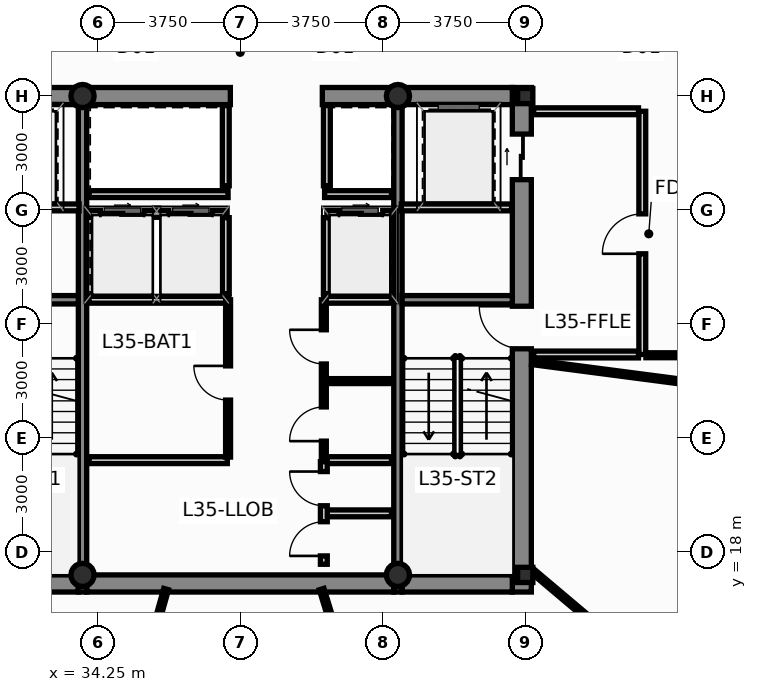
"""IFC4 building model, lengths in metres.
Left out: names, types, materials, properties, quantities, classifications, styles, units other than length and angle.
Written with IfcOpenShell. Run it as: python <this file> out.ifc"""

import sys

from ifc_helpers import new_model, si_unit, direction, frame, frame_2d, origin, origin_2d, place, context, subcontext, project, spatial, rectangle, hollow_circle, i_section, extrude, source, transform, mapped, element, fill, save


model = new_model("IFC4")
c1 = context("Model", 3, precision=1e-05, world=origin(), true_north=direction((0.0, 1.0)))
c2 = subcontext(c1, "Body", "Model", "MODEL_VIEW")
j1 = project(units=[si_unit("LENGTHUNIT", "METRE"), si_unit("PLANEANGLEUNIT", "RADIAN")], contexts=[c1])
p1 = place(None, origin())
s1 = spatial("IfcSite", under=j1, at=p1, CompositionType="ELEMENT")
p2 = place(p1, origin())
s2 = spatial("IfcBuilding", under=s1, at=p2, CompositionType="ELEMENT")
p3 = place(p2, frame((0.0, 0.0, 135.45)))
s3 = spatial("IfcBuildingStorey", under=s2, at=p3, CompositionType="ELEMENT", Elevation=135.45)
m1 = source(origin(), c2, "Body", "SweptSolid", [
    extrude(i_section(OverallWidth=0.4, OverallDepth=0.4, WebThickness=0.02, FlangeThickness=0.032, at=origin_2d()), origin(), (0.0, 0.0, 1.0), 3.65),
])
for number, where, z_axis, x_axis in (
    (1, (45.5, 17.4, 0.0), (0.0, 0.0, 1.0), (1.0, 0.0, 0.0)),
    (2, (45.5, 30.0, 0.0), (0.0, 0.0, 1.0), (1.0, 0.0, 0.0)),
):
    element("IfcColumn", number, at=place(p3, frame(where, z_axis=z_axis, x_axis=x_axis)), inside=s3, PredefinedType="COLUMN", context=c2, shape_type="MappedRepresentation", body=[
        mapped(m1, transform((0.0, 0.0, 0.0), scale=1.0)),
    ])
m2 = source(origin(), c2, "Body", "SweptSolid", [
    extrude(hollow_circle(Radius=0.305, WallThickness=0.025, at=origin_2d()), origin(), (0.0, 0.0, 1.0), 3.65),
])
for number, where, z_axis, x_axis in (
    (3, (33.85, 17.4, 0.0), (0.0, 0.0, 1.0), (1.0, 0.0, 0.0)),
    (4, (42.15, 17.4, 0.0), (0.0, 0.0, 1.0), (1.0, 0.0, 0.0)),
    (5, (33.85, 30.0, 0.0), (0.0, 0.0, 1.0), (1.0, 0.0, 0.0)),
    (6, (42.15, 30.0, 0.0), (0.0, 0.0, 1.0), (1.0, 0.0, 0.0)),
):
    element("IfcColumn", number, at=place(p3, frame(where, z_axis=z_axis, x_axis=x_axis)), inside=s3, PredefinedType="COLUMN", context=c2, shape_type="MappedRepresentation", body=[
        mapped(m2, transform((0.0, 0.0, 0.0), scale=1.0)),
    ])
p4 = place(p3, frame((45.41, 16.95, 0.0), z_axis=(0.0, 0.0, 1.0), x_axis=(0.0, 1.0, 0.0)))
e7 = element("IfcWall", 7, at=p4, inside=s3, PredefinedType="SHEAR", context=c2, shape_type="SweptSolid", body=[
    extrude(rectangle(XDim=13.275, YDim=0.5, at=frame_2d((6.638, 0.0))), origin(), (0.0, 0.0, 1.0), 3.65),
])
p5 = place(p4, frame((6.4, 0.0, 0.0)))
e8 = element("IfcOpeningElement", 8, at=p5, cuts=e7, PredefinedType="OPENING", context=c2, shape_type="SweptSolid", body=[
    extrude(rectangle(XDim=1.12, YDim=2.15, at=frame_2d((0.56, 1.075))), frame((0.0, 0.262, 0.0), z_axis=(0.0, -1.0, 0.0), x_axis=(1.0, 0.0, 0.0)), (0.0, 0.0, 1.0), 0.524),
])
p6 = place(p4, frame((10.85, 0.0, 0.0)))
e9 = element("IfcOpeningElement", 9, at=p6, cuts=e7, PredefinedType="OPENING", context=c2, shape_type="SweptSolid", body=[
    extrude(rectangle(XDim=1.2, YDim=2.2, at=frame_2d((0.6, 1.1))), frame((0.0, 0.262, 0.0), z_axis=(0.0, -1.0, 0.0), x_axis=(1.0, 0.0, 0.0)), (0.0, 0.0, 1.0), 0.524),
])
p7 = place(p3, frame((30.84, 17.175, 0.0), z_axis=(0.0, 0.0, 1.0), x_axis=(1.0, 0.0, 0.0)))
e10 = element("IfcWall", 10, at=p7, inside=s3, PredefinedType="SHEAR", context=c2, shape_type="SweptSolid", body=[
    extrude(rectangle(XDim=2.9, YDim=0.45, at=frame_2d((1.45, 0.0))), origin(), (0.0, 0.0, 1.0), 3.65),
])
p8 = place(p3, frame((33.96, 17.175, 0.0), z_axis=(0.0, 0.0, 1.0), x_axis=(1.0, 0.0, 0.0)))
e11 = element("IfcWall", 11, at=p8, inside=s3, PredefinedType="SHEAR", context=c2, shape_type="SweptSolid", body=[
    extrude(rectangle(XDim=8.08, YDim=0.45, at=frame_2d((4.04, 0.0))), origin(), (0.0, 0.0, 1.0), 3.65),
])
for number, where, z_axis, x_axis in (
    (12, (42.26, 17.175, 0.0), (0.0, 0.0, 1.0), (1.0, 0.0, 0.0)),
    (13, (30.84, 30.0, 0.0), (0.0, 0.0, 1.0), (1.0, 0.0, 0.0)),
):
    element("IfcWall", number, at=place(p3, frame(where, z_axis=z_axis, x_axis=x_axis)), inside=s3, PredefinedType="SHEAR", context=c2, shape_type="SweptSolid", body=[
        extrude(rectangle(XDim=2.9, YDim=0.45, at=frame_2d((1.45, 0.0))), origin(), (0.0, 0.0, 1.0), 3.65),
    ])
p9 = place(p3, frame((33.96, 30.0, 0.0), z_axis=(0.0, 0.0, 1.0), x_axis=(1.0, 0.0, 0.0)))
e14 = element("IfcWall", 14, at=p9, inside=s3, PredefinedType="SHEAR", context=c2, shape_type="SweptSolid", body=[
    extrude(rectangle(XDim=3.78, YDim=0.45, at=frame_2d((1.89, 0.0))), origin(), (0.0, 0.0, 1.0), 3.65),
])
p10 = place(p3, frame((40.16, 30.0, 0.0), z_axis=(0.0, 0.0, 1.0), x_axis=(1.0, 0.0, 0.0)))
e15 = element("IfcWall", 15, at=p10, inside=s3, PredefinedType="SHEAR", context=c2, shape_type="SweptSolid", body=[
    extrude(rectangle(XDim=1.88, YDim=0.45, at=frame_2d((0.94, 0.0))), origin(), (0.0, 0.0, 1.0), 3.65),
])
p11 = place(p3, frame((42.26, 30.0, 0.0), z_axis=(0.0, 0.0, 1.0), x_axis=(1.0, 0.0, 0.0)))
e16 = element("IfcWall", 16, at=p11, inside=s3, PredefinedType="SHEAR", context=c2, shape_type="SweptSolid", body=[
    extrude(rectangle(XDim=2.9, YDim=0.45, at=frame_2d((1.45, 0.0))), origin(), (0.0, 0.0, 1.0), 3.65),
])
for number, where, z_axis, x_axis in (
    (17, (33.85, 16.95, 0.0), (0.0, 0.0, 1.0), (0.0, 1.0, 0.0)),
    (18, (42.15, 16.95, 0.0), (0.0, 0.0, 1.0), (0.0, 1.0, 0.0)),
):
    element("IfcWall", number, at=place(p3, frame(where, z_axis=z_axis, x_axis=x_axis)), inside=s3, PredefinedType="SHEAR", context=c2, shape_type="SweptSolid", body=[
        extrude(rectangle(XDim=13.275, YDim=0.22, at=frame_2d((6.638, 0.0))), origin(), (0.0, 0.0, 1.0), 3.65),
    ])
for number, where, z_axis, x_axis in (
    (19, (30.84, 24.64, 0.0), (0.0, 0.0, 1.0), (1.0, 0.0, 0.0)),
    (20, (42.26, 24.64, 0.0), (0.0, 0.0, 1.0), (1.0, 0.0, 0.0)),
):
    element("IfcWall", number, at=place(p3, frame(where, z_axis=z_axis, x_axis=x_axis)), inside=s3, PredefinedType="SHEAR", context=c2, shape_type="SweptSolid", body=[
        extrude(rectangle(XDim=2.9, YDim=0.22, at=frame_2d((1.45, 0.0))), origin(), (0.0, 0.0, 1.0), 3.65),
    ])
p12 = place(p3, frame((34.02, 26.9, 0.0), z_axis=(0.0, 0.0, 1.0), x_axis=(1.0, 0.0, 0.0)))
e21 = element("IfcWall", 21, at=p12, inside=s3, PredefinedType="PARTITIONING", context=c2, shape_type="SweptSolid", body=[
    extrude(rectangle(XDim=3.6, YDim=0.18, at=frame_2d((1.8, 0.0))), origin(), (0.0, 0.0, 1.0), 3.4),
])
p13 = place(p12, frame((0.3, 0.0, 0.0)))
e22 = element("IfcOpeningElement", 22, at=p13, cuts=e21, PredefinedType="OPENING", context=c2, shape_type="SweptSolid", body=[
    extrude(rectangle(XDim=1.15, YDim=2.2, at=frame_2d((0.575, 1.1))), frame((0.0, 0.102, 0.0), z_axis=(0.0, -1.0, 0.0), x_axis=(1.0, 0.0, 0.0)), (0.0, 0.0, 1.0), 0.204),
])
p14 = place(p12, frame((2.1, 0.0, 0.0)))
e23 = element("IfcOpeningElement", 23, at=p14, cuts=e21, PredefinedType="OPENING", context=c2, shape_type="SweptSolid", body=[
    extrude(rectangle(XDim=1.15, YDim=2.2, at=frame_2d((0.575, 1.1))), frame((0.0, 0.102, 0.0), z_axis=(0.0, -1.0, 0.0), x_axis=(1.0, 0.0, 0.0)), (0.0, 0.0, 1.0), 0.204),
])
p15 = place(p3, frame((40.28, 26.9, 0.0), z_axis=(0.0, 0.0, 1.0), x_axis=(1.0, 0.0, 0.0)))
e24 = element("IfcWall", 24, at=p15, inside=s3, PredefinedType="PARTITIONING", context=c2, shape_type="SweptSolid", body=[
    extrude(rectangle(XDim=1.7, YDim=0.18, at=frame_2d((0.85, 0.0))), origin(), (0.0, 0.0, 1.0), 3.4),
])
p16 = place(p15, frame((0.32, 0.0, 0.0)))
e25 = element("IfcOpeningElement", 25, at=p16, cuts=e24, PredefinedType="OPENING", context=c2, shape_type="SweptSolid", body=[
    extrude(rectangle(XDim=1.15, YDim=2.2, at=frame_2d((0.575, 1.1))), frame((0.0, 0.102, 0.0), z_axis=(0.0, -1.0, 0.0), x_axis=(1.0, 0.0, 0.0)), (0.0, 0.0, 1.0), 0.204),
])
for number, where, z_axis, x_axis in (
    (26, (37.62, 24.8, 0.0), (0.0, 0.0, 1.0), (0.0, 1.0, 0.0)),
    (27, (40.28, 24.8, 0.0), (0.0, 0.0, 1.0), (0.0, 1.0, 0.0)),
):
    element("IfcWall", number, at=place(p3, frame(where, z_axis=z_axis, x_axis=x_axis)), inside=s3, PredefinedType="PARTITIONING", context=c2, shape_type="SweptSolid", body=[
        extrude(rectangle(XDim=2.0, YDim=0.18, at=frame_2d((1.0, 0.0))), origin(), (0.0, 0.0, 1.0), 3.4),
    ])
p17 = place(p3, frame((34.02, 24.64, 0.0), z_axis=(0.0, 0.0, 1.0), x_axis=(1.0, 0.0, 0.0)))
e28 = element("IfcWall", 28, at=p17, inside=s3, PredefinedType="PARTITIONING", context=c2, shape_type="SweptSolid", body=[
    extrude(rectangle(XDim=3.68, YDim=0.18, at=frame_2d((1.84, 0.0))), origin(), (0.0, 0.0, 1.0), 3.4),
])
p18 = place(p3, frame((40.2, 24.64, 0.0), z_axis=(0.0, 0.0, 1.0), x_axis=(1.0, 0.0, 0.0)))
e29 = element("IfcWall", 29, at=p18, inside=s3, PredefinedType="PARTITIONING", context=c2, shape_type="SweptSolid", body=[
    extrude(rectangle(XDim=1.78, YDim=0.18, at=frame_2d((0.89, 0.0))), origin(), (0.0, 0.0, 1.0), 3.4),
])
p19 = place(p3, frame((34.02, 27.42, 0.0), z_axis=(0.0, 0.0, 1.0), x_axis=(1.0, 0.0, 0.0)))
e30 = element("IfcWall", 30, at=p19, inside=s3, PredefinedType="PARTITIONING", context=c2, shape_type="SweptSolid", body=[
    extrude(rectangle(XDim=3.66, YDim=0.18, at=frame_2d((1.83, 0.0))), origin(), (0.0, 0.0, 1.0), 3.4),
])
p20 = place(p3, frame((40.22, 27.42, 0.0), z_axis=(0.0, 0.0, 1.0), x_axis=(1.0, 0.0, 0.0)))
e31 = element("IfcWall", 31, at=p20, inside=s3, PredefinedType="PARTITIONING", context=c2, shape_type="SweptSolid", body=[
    extrude(rectangle(XDim=1.76, YDim=0.18, at=frame_2d((0.88, 0.0))), origin(), (0.0, 0.0, 1.0), 3.4),
])
for number, where, z_axis, x_axis in (
    (32, (37.62, 27.64, 0.0), (0.0, 0.0, 1.0), (0.0, 1.0, 0.0)),
    (33, (40.28, 27.64, 0.0), (0.0, 0.0, 1.0), (0.0, 1.0, 0.0)),
):
    element("IfcWall", number, at=place(p3, frame(where, z_axis=z_axis, x_axis=x_axis)), inside=s3, PredefinedType="PARTITIONING", context=c2, shape_type="SweptSolid", body=[
        extrude(rectangle(XDim=2.11, YDim=0.18, at=frame_2d((1.055, 0.0))), origin(), (0.0, 0.0, 1.0), 3.4),
    ])
p21 = place(p3, frame((48.58, 23.2, 0.0), z_axis=(0.0, 0.0, 1.0), x_axis=(0.0, 1.0, 0.0)))
e34 = element("IfcWall", 34, at=p21, inside=s3, PredefinedType="PARTITIONING", context=c2, shape_type="SweptSolid", body=[
    extrude(rectangle(XDim=6.4, YDim=0.18, at=frame_2d((3.2, 0.0))), origin(), (0.0, 0.0, 1.0), 3.078),
])
p22 = place(p21, frame((2.65, 0.0, 0.0)))
e35 = element("IfcOpeningElement", 35, at=p22, cuts=e34, PredefinedType="OPENING", context=c2, shape_type="SweptSolid", body=[
    extrude(rectangle(XDim=1.05, YDim=2.15, at=frame_2d((0.525, 1.075))), frame((0.0, 0.102, 0.0), z_axis=(0.0, -1.0, 0.0), x_axis=(1.0, 0.0, 0.0)), (0.0, 0.0, 1.0), 0.204),
])
p23 = place(p3, frame((45.72, 23.2, 0.0), z_axis=(0.0, 0.0, 1.0), x_axis=(1.0, 0.0, 0.0)))
e36 = element("IfcWall", 36, at=p23, inside=s3, PredefinedType="PARTITIONING", context=c2, shape_type="SweptSolid", body=[
    extrude(rectangle(XDim=2.76, YDim=0.18, at=frame_2d((1.38, 0.0))), origin(), (0.0, 0.0, 1.0), 3.4),
])
p24 = place(p3, frame((45.72, 29.6, 0.0), z_axis=(0.0, 0.0, 1.0), x_axis=(1.0, 0.0, 0.0)))
e37 = element("IfcWall", 37, at=p24, inside=s3, PredefinedType="PARTITIONING", context=c2, shape_type="SweptSolid", body=[
    extrude(rectangle(XDim=2.76, YDim=0.18, at=frame_2d((1.38, 0.0))), origin(), (0.0, 0.0, 1.0), 2.925),
])
for number, where, z_axis, x_axis in (
    (38, (30.86, 27.07, 0.0), (0.0, 0.0, 1.0), (1.0, 0.0, 0.0)),
    (39, (42.24, 27.07, 0.0), (0.0, 0.0, 1.0), (1.0, 0.0, 0.0)),
):
    element("IfcWall", number, at=place(p3, frame(where, z_axis=z_axis, x_axis=x_axis)), inside=s3, PredefinedType="PARTITIONING", context=c2, shape_type="SweptSolid", body=[
        extrude(rectangle(XDim=2.9, YDim=0.18, at=frame_2d((1.45, 0.0))), origin(), (0.0, 0.0, 1.0), 3.4),
    ])
p25 = place(p3, frame((34.02, 20.42, 0.0), z_axis=(0.0, 0.0, 1.0), x_axis=(1.0, 0.0, 0.0)))
e40 = element("IfcWall", 40, at=p25, inside=s3, PredefinedType="PARTITIONING", context=c2, shape_type="SweptSolid", body=[
    extrude(rectangle(XDim=3.64, YDim=0.18, at=frame_2d((1.82, 0.0))), origin(), (0.0, 0.0, 1.0), 3.4),
])
p26 = place(p3, frame((40.22, 20.42, 0.0), z_axis=(0.0, 0.0, 1.0), x_axis=(1.0, 0.0, 0.0)))
e41 = element("IfcWall", 41, at=p26, inside=s3, PredefinedType="PARTITIONING", context=c2, shape_type="SweptSolid", body=[
    extrude(rectangle(XDim=1.76, YDim=0.18, at=frame_2d((0.88, 0.0))), origin(), (0.0, 0.0, 1.0), 3.4),
])
p27 = place(p3, frame((40.28, 22.5, 0.0), z_axis=(0.0, 0.0, 1.0), x_axis=(1.0, 0.0, 0.0)))
e42 = element("IfcWall", 42, at=p27, inside=s3, PredefinedType="PARTITIONING", context=c2, shape_type="SweptSolid", body=[
    extrude(rectangle(XDim=1.7, YDim=0.13, at=frame_2d((0.85, 0.0))), origin(), (0.0, 0.0, 1.0), 3.4),
])
p28 = place(p3, frame((37.68, 20.5, 0.0), z_axis=(0.0, 0.0, 1.0), x_axis=(0.0, 1.0, 0.0)))
e43 = element("IfcWall", 43, at=p28, inside=s3, PredefinedType="PARTITIONING", context=c2, shape_type="SweptSolid", body=[
    extrude(rectangle(XDim=4.14, YDim=0.13, at=frame_2d((2.07, 0.0))), origin(), (0.0, 0.0, 1.0), 3.4),
])
p29 = place(p28, frame((1.5, 0.0, 0.0)))
e44 = element("IfcOpeningElement", 44, at=p29, cuts=e43, PredefinedType="OPENING", context=c2, shape_type="SweptSolid", body=[
    extrude(rectangle(XDim=0.9, YDim=2.1, at=frame_2d((0.45, 1.05))), frame((0.0, 0.077, 0.0), z_axis=(0.0, -1.0, 0.0), x_axis=(1.0, 0.0, 0.0)), (0.0, 0.0, 1.0), 0.154),
])
p30 = place(p3, frame((40.2, 20.5, 0.0), z_axis=(0.0, 0.0, 1.0), x_axis=(0.0, 1.0, 0.0)))
e45 = element("IfcWall", 45, at=p30, inside=s3, PredefinedType="PARTITIONING", context=c2, shape_type="SweptSolid", body=[
    extrude(rectangle(XDim=4.14, YDim=0.13, at=frame_2d((2.07, 0.0))), origin(), (0.0, 0.0, 1.0), 3.4),
])
p31 = place(p30, frame((0.42, 0.0, 0.0)))
e46 = element("IfcOpeningElement", 46, at=p31, cuts=e45, PredefinedType="OPENING", context=c2, shape_type="SweptSolid", body=[
    extrude(rectangle(XDim=0.9, YDim=2.1, at=frame_2d((0.45, 1.05))), frame((0.0, 0.077, 0.0), z_axis=(0.0, -1.0, 0.0), x_axis=(1.0, 0.0, 0.0)), (0.0, 0.0, 1.0), 0.154),
])
p32 = place(p30, frame((2.45, 0.0, 0.0)))
e47 = element("IfcOpeningElement", 47, at=p32, cuts=e45, PredefinedType="OPENING", context=c2, shape_type="SweptSolid", body=[
    extrude(rectangle(XDim=0.9, YDim=2.1, at=frame_2d((0.45, 1.05))), frame((0.0, 0.077, 0.0), z_axis=(0.0, -1.0, 0.0), x_axis=(1.0, 0.0, 0.0)), (0.0, 0.0, 1.0), 0.154),
])
p33 = place(p3, frame((40.28, 19.02, 0.0), z_axis=(0.0, 0.0, 1.0), x_axis=(1.0, 0.0, 0.0)))
e48 = element("IfcWall", 48, at=p33, inside=s3, PredefinedType="PARTITIONING", context=c2, shape_type="SweptSolid", body=[
    extrude(rectangle(XDim=1.7, YDim=0.18, at=frame_2d((0.85, 0.0))), origin(), (0.0, 0.0, 1.0), 3.4),
])
p34 = place(p3, frame((40.2, 17.68, 0.0), z_axis=(0.0, 0.0, 1.0), x_axis=(0.0, 1.0, 0.0)))
e49 = element("IfcWall", 49, at=p34, inside=s3, PredefinedType="PARTITIONING", context=c2, shape_type="SweptSolid", body=[
    extrude(rectangle(XDim=2.7, YDim=0.18, at=frame_2d((1.35, 0.0))), origin(), (0.0, 0.0, 1.0), 3.4),
])
p35 = place(p34, frame((0.22, 0.0, 0.0)))
e50 = element("IfcOpeningElement", 50, at=p35, cuts=e49, PredefinedType="OPENING", context=c2, shape_type="SweptSolid", body=[
    extrude(rectangle(XDim=0.9, YDim=2.1, at=frame_2d((0.45, 1.05))), frame((0.0, 0.102, 0.0), z_axis=(0.0, -1.0, 0.0), x_axis=(1.0, 0.0, 0.0)), (0.0, 0.0, 1.0), 0.204),
])
p36 = place(p34, frame((1.54, 0.0, 0.0)))
e51 = element("IfcOpeningElement", 51, at=p36, cuts=e49, PredefinedType="OPENING", context=c2, shape_type="SweptSolid", body=[
    extrude(rectangle(XDim=0.9, YDim=2.1, at=frame_2d((0.45, 1.05))), frame((0.0, 0.102, 0.0), z_axis=(0.0, -1.0, 0.0), x_axis=(1.0, 0.0, 0.0)), (0.0, 0.0, 1.0), 0.204),
])
p37 = place(p3, frame((45.657, 17.532, 0.0), z_axis=(0.0, 0.0, 1.0), x_axis=(0.764236058159, -0.644936622785, 0.0)))
e52 = element("IfcWall", 52, at=p37, inside=s3, PredefinedType="PARTITIONING", context=c2, shape_type="SweptSolid", body=[
    extrude(rectangle(XDim=16.758, YDim=0.13, at=frame_2d((8.379, 0.0))), origin(), (0.0, 0.0, 1.0), 2.925),
])
p38 = place(p37, frame((7.949, 0.0, 0.0)))
e53 = element("IfcOpeningElement", 53, at=p38, cuts=e52, PredefinedType="OPENING", context=c2, shape_type="SweptSolid", body=[
    extrude(rectangle(XDim=0.96, YDim=2.15, at=frame_2d((0.48, 1.075))), frame((0.0, 0.077, 0.0), z_axis=(0.0, -1.0, 0.0), x_axis=(1.0, 0.0, 0.0)), (0.0, 0.0, 1.0), 0.154),
])
p39 = place(p3, frame((45.674, 23.0, 0.0), z_axis=(0.0, 0.0, 1.0), x_axis=(0.991568990445, -0.129579848696, 0.0)))
e54 = element("IfcWall", 54, at=p39, inside=s3, PredefinedType="PARTITIONING", context=c2, shape_type="SweptSolid", body=[
    extrude(rectangle(XDim=14.615, YDim=0.13, at=frame_2d((7.308, 0.0))), origin(), (0.0, 0.0, 1.0), 3.4),
])
p40 = place(p3, frame((32.937, 5.925, 0.0), z_axis=(0.0, 0.0, 1.0), x_axis=(0.270006068568, 0.96285862043, 0.0)))
e55 = element("IfcWall", 55, at=p40, inside=s3, PredefinedType="PARTITIONING", context=c2, shape_type="SweptSolid", body=[
    extrude(rectangle(XDim=11.531, YDim=0.13, at=frame_2d((5.766, 0.0))), origin(), (0.0, 0.0, 1.0), 3.4),
])
p41 = place(p40, frame((5.335, 0.0, 0.0)))
e56 = element("IfcOpeningElement", 56, at=p41, cuts=e55, PredefinedType="OPENING", context=c2, shape_type="SweptSolid", body=[
    extrude(rectangle(XDim=0.96, YDim=2.15, at=frame_2d((0.48, 1.075))), frame((0.0, 0.077, 0.0), z_axis=(0.0, -1.0, 0.0), x_axis=(1.0, 0.0, 0.0)), (0.0, 0.0, 1.0), 0.154),
])
p42 = place(p3, frame((40.142, 17.028, 0.0), z_axis=(0.0, 0.0, 1.0), x_axis=(0.294275666781, -0.955720582566, 0.0)))
e57 = element("IfcWall", 57, at=p42, inside=s3, PredefinedType="PARTITIONING", context=c2, shape_type="SweptSolid", body=[
    extrude(rectangle(XDim=11.478, YDim=0.13, at=frame_2d((5.739, 0.0))), origin(), (0.0, 0.0, 1.0), 3.4),
])
p43 = place(p42, frame((5.31, 0.0, 0.0)))
e58 = element("IfcOpeningElement", 58, at=p43, cuts=e57, PredefinedType="OPENING", context=c2, shape_type="SweptSolid", body=[
    extrude(rectangle(XDim=0.96, YDim=2.15, at=frame_2d((0.48, 1.075))), frame((0.0, 0.077, 0.0), z_axis=(0.0, -1.0, 0.0), x_axis=(1.0, 0.0, 0.0)), (0.0, 0.0, 1.0), 0.154),
])
p44 = place(p3, frame((48.675, 23.18, 0.0), z_axis=(0.0, 0.0, 1.0), x_axis=(1.0, 0.0, 0.0)))
e59 = element("IfcWall", 59, at=p44, inside=s3, PredefinedType="PARTITIONING", context=c2, shape_type="SweptSolid", body=[
    extrude(rectangle(XDim=1.92, YDim=0.13, at=frame_2d((0.96, 0.0))), origin(), (0.0, 0.0, 1.0), 3.4),
])
p45 = place(p5, origin())
e60 = element("IfcDoor", 60, at=p45, inside=s3, OperationType="SINGLE_SWING_RIGHT", PredefinedType="DOOR", context=c2, shape_type="SweptSolid", body=[
    extrude(rectangle(XDim=1.12, YDim=2.15, at=frame_2d((0.56, 1.075))), frame((0.0, 0.025, 0.0), z_axis=(0.0, -1.0, 0.0), x_axis=(1.0, 0.0, 0.0)), (0.0, 0.0, 1.0), 0.05),
])
fill(e8, e60)
p46 = place(p6, origin())
e61 = element("IfcDoor", 61, at=p46, inside=s3, OperationType="SLIDING_TO_RIGHT", PredefinedType="DOOR", context=c2, shape_type="SweptSolid", body=[
    extrude(rectangle(XDim=1.2, YDim=2.2, at=frame_2d((0.6, 1.1))), frame((0.0, 0.025, 0.0), z_axis=(0.0, -1.0, 0.0), x_axis=(1.0, 0.0, 0.0)), (0.0, 0.0, 1.0), 0.05),
])
fill(e9, e61)
p47 = place(p13, origin())
e62 = element("IfcDoor", 62, at=p47, inside=s3, OperationType="SLIDING_TO_LEFT", PredefinedType="DOOR", context=c2, shape_type="SweptSolid", body=[
    extrude(rectangle(XDim=1.15, YDim=2.2, at=frame_2d((0.575, 1.1))), frame((0.0, 0.025, 0.0), z_axis=(0.0, -1.0, 0.0), x_axis=(1.0, 0.0, 0.0)), (0.0, 0.0, 1.0), 0.05),
])
fill(e22, e62)
p48 = place(p14, origin())
e63 = element("IfcDoor", 63, at=p48, inside=s3, OperationType="SLIDING_TO_RIGHT", PredefinedType="DOOR", context=c2, shape_type="SweptSolid", body=[
    extrude(rectangle(XDim=1.15, YDim=2.2, at=frame_2d((0.575, 1.1))), frame((0.0, 0.025, 0.0), z_axis=(0.0, -1.0, 0.0), x_axis=(1.0, 0.0, 0.0)), (0.0, 0.0, 1.0), 0.05),
])
fill(e23, e63)
p49 = place(p16, origin())
e64 = element("IfcDoor", 64, at=p49, inside=s3, OperationType="SLIDING_TO_LEFT", PredefinedType="DOOR", context=c2, shape_type="SweptSolid", body=[
    extrude(rectangle(XDim=1.15, YDim=2.2, at=frame_2d((0.575, 1.1))), frame((0.0, 0.025, 0.0), z_axis=(0.0, -1.0, 0.0), x_axis=(1.0, 0.0, 0.0)), (0.0, 0.0, 1.0), 0.05),
])
fill(e25, e64)
p50 = place(p22, origin())
e65 = element("IfcDoor", 65, at=p50, inside=s3, OperationType="SINGLE_SWING_LEFT", PredefinedType="DOOR", context=c2, shape_type="SweptSolid", body=[
    extrude(rectangle(XDim=1.05, YDim=2.15, at=frame_2d((0.525, 1.075))), frame((0.0, 0.025, 0.0), z_axis=(0.0, -1.0, 0.0), x_axis=(1.0, 0.0, 0.0)), (0.0, 0.0, 1.0), 0.05),
])
fill(e35, e65)
p51 = place(p29, origin())
e66 = element("IfcDoor", 66, at=p51, inside=s3, OperationType="SINGLE_SWING_RIGHT", PredefinedType="DOOR", context=c2, shape_type="SweptSolid", body=[
    extrude(rectangle(XDim=0.9, YDim=2.1, at=frame_2d((0.45, 1.05))), frame((0.0, 0.025, 0.0), z_axis=(0.0, -1.0, 0.0), x_axis=(1.0, 0.0, 0.0)), (0.0, 0.0, 1.0), 0.05),
])
fill(e44, e66)
p52 = place(p31, origin())
e67 = element("IfcDoor", 67, at=p52, inside=s3, OperationType="SINGLE_SWING_LEFT", PredefinedType="DOOR", context=c2, shape_type="SweptSolid", body=[
    extrude(rectangle(XDim=0.9, YDim=2.1, at=frame_2d((0.45, 1.05))), frame((0.0, 0.025, 0.0), z_axis=(0.0, -1.0, 0.0), x_axis=(1.0, 0.0, 0.0)), (0.0, 0.0, 1.0), 0.05),
])
fill(e46, e67)
p53 = place(p32, origin())
e68 = element("IfcDoor", 68, at=p53, inside=s3, OperationType="SINGLE_SWING_RIGHT", PredefinedType="DOOR", context=c2, shape_type="SweptSolid", body=[
    extrude(rectangle(XDim=0.9, YDim=2.1, at=frame_2d((0.45, 1.05))), frame((0.0, 0.025, 0.0), z_axis=(0.0, -1.0, 0.0), x_axis=(1.0, 0.0, 0.0)), (0.0, 0.0, 1.0), 0.05),
])
fill(e47, e68)
p54 = place(p35, origin())
e69 = element("IfcDoor", 69, at=p54, inside=s3, OperationType="SINGLE_SWING_LEFT", PredefinedType="DOOR", context=c2, shape_type="SweptSolid", body=[
    extrude(rectangle(XDim=0.9, YDim=2.1, at=frame_2d((0.45, 1.05))), frame((0.0, 0.025, 0.0), z_axis=(0.0, -1.0, 0.0), x_axis=(1.0, 0.0, 0.0)), (0.0, 0.0, 1.0), 0.05),
])
fill(e50, e69)
p55 = place(p36, origin())
e70 = element("IfcDoor", 70, at=p55, inside=s3, OperationType="SINGLE_SWING_RIGHT", PredefinedType="DOOR", context=c2, shape_type="SweptSolid", body=[
    extrude(rectangle(XDim=0.9, YDim=2.1, at=frame_2d((0.45, 1.05))), frame((0.0, 0.025, 0.0), z_axis=(0.0, -1.0, 0.0), x_axis=(1.0, 0.0, 0.0)), (0.0, 0.0, 1.0), 0.05),
])
fill(e51, e70)
save(model, sys.argv[1])
